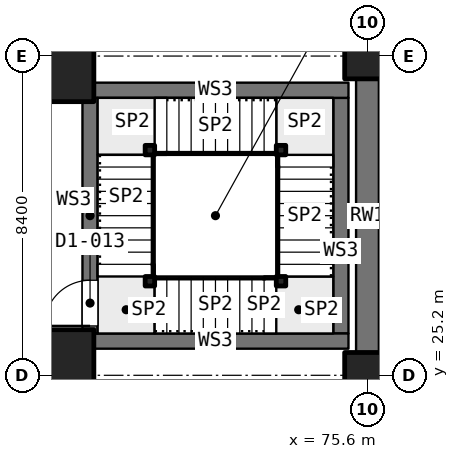
"""IFC4 building model, lengths in metres.
Left out: names, types, materials, properties, quantities, classifications, styles, units other than length and angle.
Written with IfcOpenShell. Run it as: python <this file> out.ifc"""

import sys

from ifc_helpers import new_model, si_unit, direction, frame, frame_2d, origin, origin_2d, place, context, subcontext, project, spatial, rectangle, extrude, element, fill, save


model = new_model("IFC4")
c1 = context("Model", 3, precision=1e-05, world=origin(), true_north=direction((0.0, 1.0)))
c2 = subcontext(c1, "Body", "Model", "MODEL_VIEW")
j1 = project(units=[si_unit("LENGTHUNIT", "METRE"), si_unit("PLANEANGLEUNIT", "RADIAN")], contexts=[c1])
p1 = place(None, origin())
s1 = spatial("IfcSite", under=j1, at=p1, CompositionType="ELEMENT")
p2 = place(p1, origin())
s2 = spatial("IfcBuilding", under=s1, at=p2, CompositionType="ELEMENT")
p3 = place(p2, frame((0.0, 0.0, -5.4)))
s3 = spatial("IfcBuildingStorey", under=s2, at=p3, CompositionType="ELEMENT", Elevation=-5.4)
for number, where, z_axis, x_axis in (
    (1, (67.2, 25.2, 0.0), (0.0, 0.0, 1.0), (1.0, 0.0, 0.0)),
    (2, (67.2, 33.6, 0.0), (0.0, 0.0, 1.0), (1.0, 0.0, 0.0)),
):
    element("IfcColumn", number, at=place(p3, frame(where, z_axis=z_axis, x_axis=x_axis)), inside=s3, PredefinedType="COLUMN", context=c2, shape_type="SweptSolid", body=[
        extrude(rectangle(XDim=2.4, YDim=2.4, at=origin_2d()), origin(), (0.0, 0.0, 1.0), 5.4),
    ])
for number, where, z_axis, x_axis in (
    (3, (75.6, 25.2, 0.0), (0.0, 0.0, 1.0), (1.0, 0.0, 0.0)),
    (4, (75.6, 33.6, 0.0), (0.0, 0.0, 1.0), (1.0, 0.0, 0.0)),
):
    element("IfcColumn", number, at=place(p3, frame(where, z_axis=z_axis, x_axis=x_axis)), inside=s3, PredefinedType="COLUMN", context=c2, shape_type="SweptSolid", body=[
        extrude(rectangle(XDim=1.2, YDim=1.2, at=origin_2d()), origin(), (0.0, 0.0, 1.0), 5.4),
    ])
p4 = place(p3, frame((75.6, 25.8, 0.0), z_axis=(0.0, 0.0, 1.0), x_axis=(0.0, 1.0, 0.0)))
e5 = element("IfcWall", 5, at=p4, inside=s3, PredefinedType="SOLIDWALL", context=c2, shape_type="SweptSolid", body=[
    extrude(rectangle(XDim=7.2, YDim=0.6, at=frame_2d((3.6, 0.0))), origin(), (0.0, 0.0, 1.0), 5.1),
])
for number, where, z_axis, x_axis in (
    (6, (68.1, 26.1, 0.0), (0.0, 0.0, 1.0), (1.0, 0.0, 0.0)),
    (7, (68.1, 32.7, 0.0), (0.0, 0.0, 1.0), (1.0, 0.0, 0.0)),
):
    element("IfcWall", number, at=place(p3, frame(where, z_axis=z_axis, x_axis=x_axis)), inside=s3, PredefinedType="SOLIDWALL", context=c2, shape_type="SweptSolid", body=[
        extrude(rectangle(XDim=7.0, YDim=0.4, at=frame_2d((3.5, 0.0))), origin(), (0.0, 0.0, 1.0), 5.1),
    ])
p5 = place(p3, frame((68.3, 26.3, 0.0), z_axis=(0.0, 0.0, 1.0), x_axis=(0.0, 1.0, 0.0)))
e8 = element("IfcWall", 8, at=p5, inside=s3, PredefinedType="SOLIDWALL", context=c2, shape_type="SweptSolid", body=[
    extrude(rectangle(XDim=6.2, YDim=0.4, at=frame_2d((3.1, 0.0))), origin(), (0.0, 0.0, 1.0), 5.1),
])
p6 = place(p5, frame((0.2, 0.0, 0.0)))
e9 = element("IfcOpeningElement", 9, at=p6, cuts=e8, PredefinedType="OPENING", context=c2, shape_type="SweptSolid", body=[
    extrude(rectangle(XDim=1.2, YDim=2.1, at=frame_2d((0.6, 1.05))), frame((0.0, 0.21, 0.0), z_axis=(0.0, -1.0, 0.0), x_axis=(1.0, 0.0, 0.0)), (0.0, 0.0, 1.0), 0.42),
])
p7 = place(p3, frame((74.9, 26.3, 0.0), z_axis=(0.0, 0.0, 1.0), x_axis=(0.0, 1.0, 0.0)))
e10 = element("IfcWall", 10, at=p7, inside=s3, PredefinedType="SOLIDWALL", context=c2, shape_type="SweptSolid", body=[
    extrude(rectangle(XDim=6.2, YDim=0.4, at=frame_2d((3.1, 0.0))), origin(), (0.0, 0.0, 1.0), 5.1),
])
for number, where, z_axis, x_axis in (
    (11, (69.875, 27.675, 0.0), (0.0, 0.0, 1.0), (1.0, 0.0, 0.0)),
    (12, (73.325, 27.675, 0.0), (0.0, 0.0, 1.0), (1.0, 0.0, 0.0)),
    (13, (73.325, 31.125, 0.0), (0.0, 0.0, 1.0), (1.0, 0.0, 0.0)),
    (14, (69.875, 31.125, 0.0), (0.0, 0.0, 1.0), (1.0, 0.0, 0.0)),
):
    element("IfcColumn", number, at=place(p3, frame(where, z_axis=z_axis, x_axis=x_axis)), inside=s3, PredefinedType="COLUMN", context=c2, shape_type="SweptSolid", body=[
        extrude(rectangle(XDim=0.25, YDim=0.25, at=origin_2d()), origin(), (0.0, 0.0, 1.0), 5.4),
    ])
p8 = place(p6, origin())
e15 = element("IfcDoor", 15, at=p8, inside=s3, OperationType="SINGLE_SWING_RIGHT", PredefinedType="DOOR", context=c2, shape_type="SweptSolid", body=[
    extrude(rectangle(XDim=1.2, YDim=2.1, at=frame_2d((0.6, 1.05))), frame((0.0, 0.025, 0.0), z_axis=(0.0, -1.0, 0.0), x_axis=(1.0, 0.0, 0.0)), (0.0, 0.0, 1.0), 0.05),
])
fill(e9, e15)
save(model, sys.argv[1])
